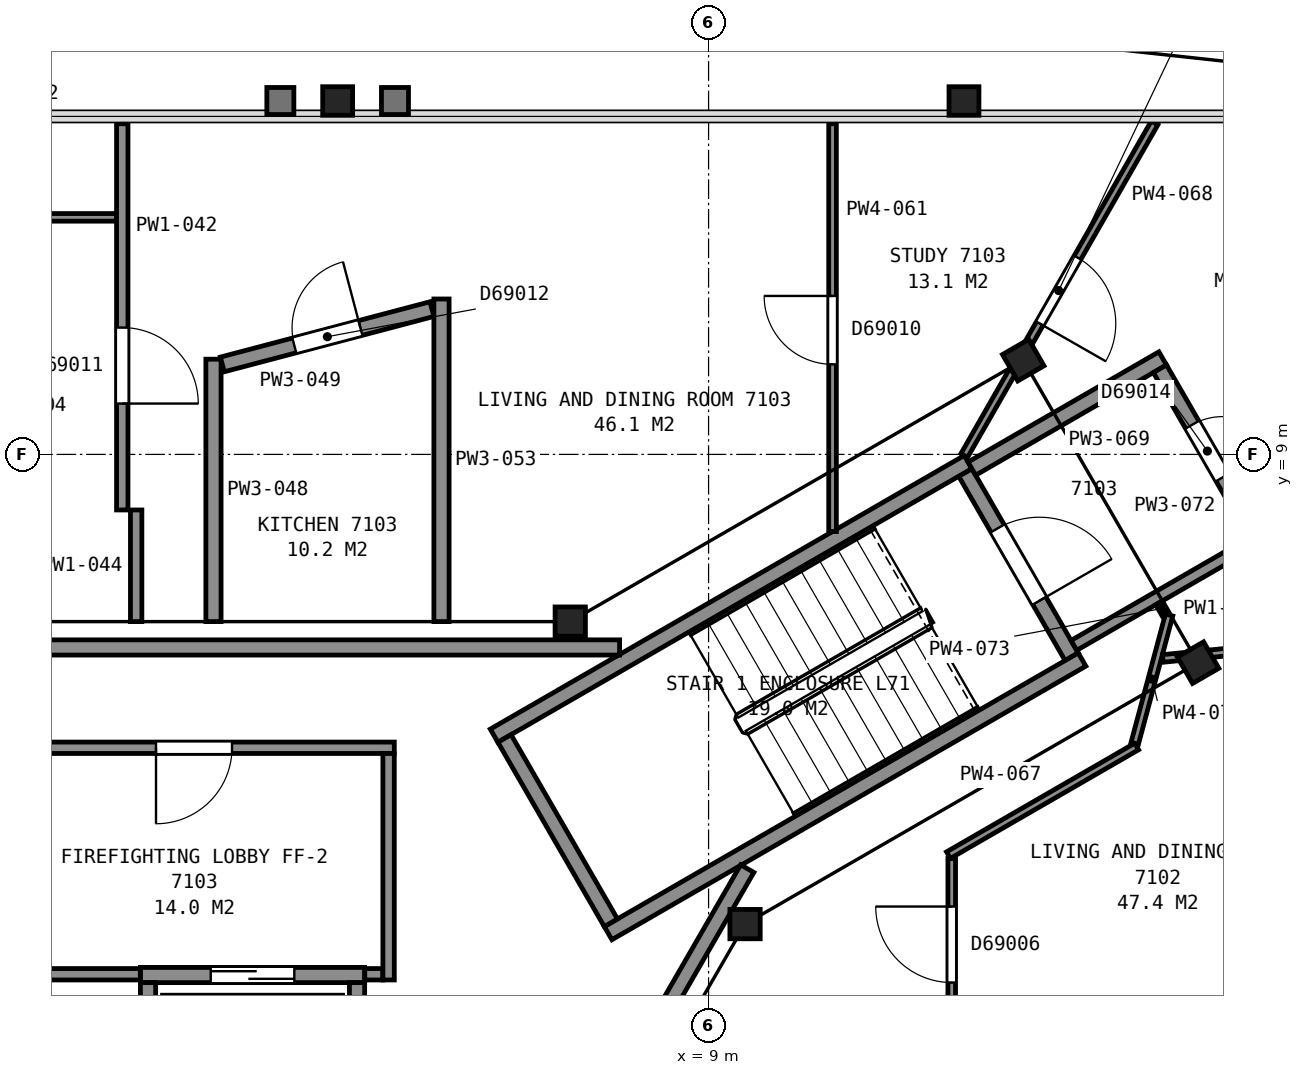
"""IFC4 building model, lengths in metres.
Left out: names, types, materials, properties, quantities, classifications, styles, units other than length and angle.
Written with IfcOpenShell. Run it as: python <this file> out.ifc"""

import sys

from ifc_helpers import new_model, si_unit, direction, frame, frame_2d, origin, origin_2d, place, context, subcontext, project, spatial, rectangle, i_section, extrude, element, fill, save


model = new_model("IFC4")
c1 = context("Model", 3, precision=1e-05, world=origin(), true_north=direction((0.0, 1.0)))
c2 = subcontext(c1, "Body", "Model", "MODEL_VIEW")
j1 = project(units=[si_unit("LENGTHUNIT", "METRE"), si_unit("PLANEANGLEUNIT", "RADIAN")], contexts=[c1])
p1 = place(None, origin())
s1 = spatial("IfcSite", under=j1, at=p1, CompositionType="ELEMENT")
p2 = place(p1, origin())
s2 = spatial("IfcBuilding", under=s1, at=p2, CompositionType="ELEMENT")
p3 = place(p2, frame((0.0, 0.0, 282.5)))
s3 = spatial("IfcBuildingStorey", under=s2, at=p3, CompositionType="ELEMENT", Elevation=282.5)
for number, where, z_axis, x_axis in (
    (1, (12.36, 13.65, 0.0), (0.0, 0.0, 1.0), (1.0, 0.0, 0.0)),
    (2, (4.12, 13.65, 0.0), (0.0, 0.0, 1.0), (1.0, 0.0, 0.0)),
):
    element("IfcColumn", number, at=place(p3, frame(where, z_axis=z_axis, x_axis=x_axis)), inside=s3, PredefinedType="COLUMN", context=c2, shape_type="SweptSolid", body=[
        extrude(i_section(OverallWidth=0.394, OverallDepth=0.376, WebThickness=0.017, FlangeThickness=0.028, FilletRadius=0.015, at=origin_2d()), origin(), (0.0, 0.0, 1.0), 3.7),
    ])
p4 = place(p3, frame((9.48, 2.82, 0.0), z_axis=(0.0, 0.0, 1.0), x_axis=(1.0, 0.0, 0.0)))
e3 = element("IfcColumn", 3, at=p4, inside=s3, PredefinedType="COLUMN", context=c2, shape_type="SweptSolid", body=[
    extrude(i_section(OverallWidth=0.399, OverallDepth=0.386, WebThickness=0.021, FlangeThickness=0.033, FilletRadius=0.015, at=origin_2d()), origin(), (0.0, 0.0, 1.0), 3.7),
])
for number, where, z_axis, x_axis in (
    (4, (15.44, 6.26, 0.0), (0.0, 0.0, 1.0), (0.5, -0.866, 0.0)),
    (5, (13.14, 10.24, 0.0), (0.0, 0.0, 1.0), (0.5, -0.866, 0.0)),
):
    element("IfcColumn", number, at=place(p3, frame(where, z_axis=z_axis, x_axis=x_axis)), inside=s3, PredefinedType="COLUMN", context=c2, shape_type="SweptSolid", body=[
        extrude(i_section(OverallWidth=0.401, OverallDepth=0.399, WebThickness=0.025, FlangeThickness=0.04, FilletRadius=0.015, at=origin_2d()), origin(), (0.0, 0.0, 1.0), 3.7),
    ])
p5 = place(p3, frame((7.18, 6.8, 0.0), z_axis=(0.0, 0.0, 1.0), x_axis=(1.0, 0.0, 0.0)))
e6 = element("IfcColumn", 6, at=p5, inside=s3, PredefinedType="COLUMN", context=c2, shape_type="SweptSolid", body=[
    extrude(i_section(OverallWidth=0.399, OverallDepth=0.386, WebThickness=0.021, FlangeThickness=0.033, FilletRadius=0.015, at=origin_2d()), origin(), (0.0, 0.0, 1.0), 3.7),
])
p6 = place(p3, frame((13.777, 6.338, 0.0), z_axis=(0.0, 0.0, 1.0), x_axis=(-0.500049511043, 0.865996816683, 0.0)))
e7 = element("IfcWall", 7, at=p6, inside=s3, PredefinedType="PARTITIONING", context=c2, shape_type="SweptSolid", body=[
    extrude(rectangle(XDim=2.8, YDim=0.2, at=frame_2d((1.4, 0.0))), origin(), (0.0, 0.0, 1.0), 3.45),
])
p7 = place(p6, frame((0.85, 0.0, 0.0)))
e8 = element("IfcOpeningElement", 8, at=p7, cuts=e7, PredefinedType="OPENING", context=c2, shape_type="SweptSolid", body=[
    extrude(rectangle(XDim=1.1, YDim=2.1, at=frame_2d((0.55, 1.05))), frame((0.0, 0.11, 0.0), z_axis=(0.0, -1.0, 0.0), x_axis=(1.0, 0.0, 0.0)), (0.0, 0.0, 1.0), 0.22),
])
for number, where, z_axis, x_axis in (
    (9, (6.178, 5.299, 0.0), (0.0, 0.0, 1.0), (0.866, 0.5, 0.0)),
    (10, (7.678, 2.701, 0.0), (0.0, 0.0, 1.0), (0.866, 0.5, 0.0)),
):
    element("IfcWall", number, at=place(p3, frame(where, z_axis=z_axis, x_axis=x_axis)), inside=s3, PredefinedType="PARTITIONING", context=c2, shape_type="SweptSolid", body=[
        extrude(rectangle(XDim=7.2, YDim=0.2, at=frame_2d((3.6, 0.0))), origin(), (0.0, 0.0, 1.0), 3.45),
    ])
p8 = place(p3, frame((7.715, 2.838, 0.0), z_axis=(0.0, 0.0, 1.0), x_axis=(-0.500049511043, 0.865996816683, 0.0)))
e11 = element("IfcWall", 11, at=p8, inside=s3, PredefinedType="PARTITIONING", context=c2, shape_type="SweptSolid", body=[
    extrude(rectangle(XDim=2.8, YDim=0.2, at=frame_2d((1.4, 0.0))), origin(), (0.0, 0.0, 1.0), 3.45),
])
p9 = place(p3, frame((1.525, 2.15, 0.0), z_axis=(0.0, 0.0, 1.0), x_axis=(1.0, 0.0, 0.0)))
e12 = element("IfcWall", 12, at=p9, inside=s3, PredefinedType="PARTITIONING", context=c2, shape_type="SweptSolid", body=[
    extrude(rectangle(XDim=2.95, YDim=0.2, at=frame_2d((1.475, 0.0))), origin(), (0.0, 0.0, 1.0), 3.7),
])
p10 = place(p9, frame((0.925, 0.0, 0.0)))
e13 = element("IfcOpeningElement", 13, at=p10, cuts=e12, PredefinedType="OPENING", context=c2, shape_type="SweptSolid", body=[
    extrude(rectangle(XDim=1.1, YDim=2.1, at=frame_2d((0.55, 1.05))), frame((0.0, 0.11, 0.0), z_axis=(0.0, -1.0, 0.0), x_axis=(1.0, 0.0, 0.0)), (0.0, 0.0, 1.0), 0.22),
])
for number, where, z_axis, x_axis in (
    (14, (4.375, 0.1, 0.0), (0.0, 0.0, 1.0), (0.0, 1.0, 0.0)),
    (15, (1.625, 0.1, 0.0), (0.0, 0.0, 1.0), (0.0, 1.0, 0.0)),
):
    element("IfcWall", number, at=place(p3, frame(where, z_axis=z_axis, x_axis=x_axis)), inside=s3, PredefinedType="PARTITIONING", context=c2, shape_type="SweptSolid", body=[
        extrude(rectangle(XDim=1.95, YDim=0.2, at=frame_2d((0.975, 0.0))), origin(), (0.0, 0.0, 1.0), 3.7),
    ])
p11 = place(p3, frame((7.829, 6.46, 0.0), z_axis=(0.0, 0.0, 1.0), x_axis=(-1.0, 0.0, 0.0)))
e16 = element("IfcWall", 16, at=p11, inside=s3, PredefinedType="PARTITIONING", context=c2, shape_type="SweptSolid", body=[
    extrude(rectangle(XDim=15.658, YDim=0.2, at=frame_2d((7.829, 0.0))), origin(), (0.0, 0.0, 1.0), 3.45),
])
p12 = place(p11, frame((12.168, 0.0, 0.0)))
e17 = element("IfcOpeningElement", 17, at=p12, cuts=e16, PredefinedType="OPENING", context=c2, shape_type="SweptSolid", body=[
    extrude(rectangle(XDim=1.2, YDim=2.1, at=frame_2d((0.6, 1.05))), frame((0.0, 0.11, 0.0), z_axis=(0.0, -1.0, 0.0), x_axis=(1.0, 0.0, 0.0)), (0.0, 0.0, 1.0), 0.22),
])
p13 = place(p3, frame((-0.245, 5.14, 0.0), z_axis=(0.0, 0.0, 1.0), x_axis=(1.0, 0.0, 0.0)))
e18 = element("IfcWall", 18, at=p13, inside=s3, PredefinedType="PARTITIONING", context=c2, shape_type="SweptSolid", body=[
    extrude(rectangle(XDim=5.11, YDim=0.15, at=frame_2d((2.555, 0.0))), origin(), (0.0, 0.0, 1.0), 3.45),
])
p14 = place(p13, frame((1.975, 0.0, 0.0)))
e19 = element("IfcOpeningElement", 19, at=p14, cuts=e18, PredefinedType="OPENING", context=c2, shape_type="SweptSolid", body=[
    extrude(rectangle(XDim=1.0, YDim=2.1, at=frame_2d((0.5, 1.05))), frame((0.0, 0.085, 0.0), z_axis=(0.0, -1.0, 0.0), x_axis=(1.0, 0.0, 0.0)), (0.0, 0.0, 1.0), 0.17),
])
p15 = place(p3, frame((0.167, 2.16, 0.0), z_axis=(0.0, 0.0, 1.0), x_axis=(1.0, 0.0, 0.0)))
e20 = element("IfcWall", 20, at=p15, inside=s3, PredefinedType="PARTITIONING", context=c2, shape_type="SweptSolid", body=[
    extrude(rectangle(XDim=1.356, YDim=0.15, at=frame_2d((0.678, 0.0))), origin(), (0.0, 0.0, 1.0), 3.45),
])
p16 = place(p3, frame((3.828, -6.29, 0.0), z_axis=(0.0, 0.0, 1.0), x_axis=(0.499979739078, 0.866037101117, 0.0)))
e21 = element("IfcWall", 21, at=p16, inside=s3, PredefinedType="PARTITIONING", context=c2, shape_type="SweptSolid", body=[
    extrude(rectangle(XDim=11.363, YDim=0.2, at=frame_2d((5.681, 0.0))), origin(), (0.0, 0.0, 1.0), 3.45),
])
p17 = place(p16, frame((0.55, 0.0, 0.0)))
e22 = element("IfcOpeningElement", 22, at=p17, cuts=e21, PredefinedType="OPENING", context=c2, shape_type="SweptSolid", body=[
    extrude(rectangle(XDim=1.2, YDim=2.1, at=frame_2d((0.6, 1.05))), frame((0.0, 0.11, 0.0), z_axis=(0.0, -1.0, 0.0), x_axis=(1.0, 0.0, 0.0)), (0.0, 0.0, 1.0), 0.22),
])
p18 = place(p3, frame((4.477, 2.16, 0.0), z_axis=(0.0, 0.0, 1.0), x_axis=(1.0, 0.0, 0.0)))
e23 = element("IfcWall", 23, at=p18, inside=s3, PredefinedType="PARTITIONING", context=c2, shape_type="SweptSolid", body=[
    extrude(rectangle(XDim=0.238, YDim=0.15, at=frame_2d((0.119, 0.0))), origin(), (0.0, 0.0, 1.0), 3.45),
])
p19 = place(p3, frame((4.79, 2.085, 0.0), z_axis=(0.0, 0.0, 1.0), x_axis=(0.0, 1.0, 0.0)))
e24 = element("IfcWall", 24, at=p19, inside=s3, PredefinedType="PARTITIONING", context=c2, shape_type="SweptSolid", body=[
    extrude(rectangle(XDim=2.98, YDim=0.15, at=frame_2d((1.49, 0.0))), origin(), (0.0, 0.0, 1.0), 3.45),
])
p20 = place(p3, frame((-3.109, 12.119, 0.0), z_axis=(0.0, 0.0, 1.0), x_axis=(1.0, 0.0, 0.0)))
e25 = element("IfcWall", 25, at=p20, inside=s3, PredefinedType="PARTITIONING", context=c2, shape_type="SweptSolid", body=[
    extrude(rectangle(XDim=4.32, YDim=0.1, at=frame_2d((2.16, 0.0))), origin(), (0.0, 0.0, 1.0), 2.723),
])
p21 = place(p20, frame((1.7, 0.0, 0.0)))
e26 = element("IfcOpeningElement", 26, at=p21, cuts=e25, PredefinedType="OPENING", context=c2, shape_type="SweptSolid", body=[
    extrude(rectangle(XDim=1.0, YDim=2.1, at=frame_2d((0.5, 1.05))), frame((0.0, 0.06, 0.0), z_axis=(0.0, -1.0, 0.0), x_axis=(1.0, 0.0, 0.0)), (0.0, 0.0, 1.0), 0.12),
])
p22 = place(p3, frame((1.286, 13.351, 0.0), z_axis=(0.0, 0.0, 1.0), x_axis=(0.0, -1.0, 0.0)))
e27 = element("IfcWall", 27, at=p22, inside=s3, PredefinedType="PARTITIONING", context=c2, shape_type="SweptSolid", body=[
    extrude(rectangle(XDim=5.082, YDim=0.15, at=frame_2d((2.541, 0.0))), origin(), (0.0, 0.0, 1.0), 2.723),
])
p23 = place(p22, frame((2.682, 0.0, 0.0)))
e28 = element("IfcOpeningElement", 28, at=p23, cuts=e27, PredefinedType="OPENING", context=c2, shape_type="SweptSolid", body=[
    extrude(rectangle(XDim=1.0, YDim=2.1, at=frame_2d((0.5, 1.05))), frame((0.0, 0.085, 0.0), z_axis=(0.0, -1.0, 0.0), x_axis=(1.0, 0.0, 0.0)), (0.0, 0.0, 1.0), 0.17),
])
p24 = place(p3, frame((1.469, 6.8, 0.0), z_axis=(0.0, 0.0, 1.0), x_axis=(0.0, 1.0, 0.0)))
e29 = element("IfcWall", 29, at=p24, inside=s3, PredefinedType="PARTITIONING", context=c2, shape_type="SweptSolid", body=[
    extrude(rectangle(XDim=1.469, YDim=0.15, at=frame_2d((0.734, 0.0))), origin(), (0.0, 0.0, 1.0), 2.723),
])
p25 = place(p3, frame((2.486, 6.8, 0.0), z_axis=(0.0, 0.0, 1.0), x_axis=(0.0, 1.0, 0.0)))
e30 = element("IfcWall", 30, at=p25, inside=s3, PredefinedType="PARTITIONING", context=c2, shape_type="SweptSolid", body=[
    extrude(rectangle(XDim=3.453, YDim=0.2, at=frame_2d((1.727, 0.0))), origin(), (0.0, 0.0, 1.0), 2.723),
])
p26 = place(p3, frame((5.36, 10.912, 0.0), z_axis=(0.0, 0.0, 1.0), x_axis=(-0.966866921155, -0.255280936963, 0.0)))
e31 = element("IfcWall", 31, at=p26, inside=s3, PredefinedType="PARTITIONING", context=c2, shape_type="SweptSolid", body=[
    extrude(rectangle(XDim=2.853, YDim=0.2, at=frame_2d((1.426, 0.0))), origin(), (0.0, 0.0, 1.0), 2.723),
])
p27 = place(p26, frame((0.973, 0.0, 0.0)))
e32 = element("IfcOpeningElement", 32, at=p27, cuts=e31, PredefinedType="OPENING", context=c2, shape_type="SweptSolid", body=[
    extrude(rectangle(XDim=0.9, YDim=2.1, at=frame_2d((0.45, 1.05))), frame((0.0, 0.11, 0.0), z_axis=(0.0, -1.0, 0.0), x_axis=(1.0, 0.0, 0.0)), (0.0, 0.0, 1.0), 0.22),
])
p28 = place(p3, frame((5.486, 6.8, 0.0), z_axis=(0.0, 0.0, 1.0), x_axis=(0.0, 1.0, 0.0)))
e33 = element("IfcWall", 33, at=p28, inside=s3, PredefinedType="PARTITIONING", context=c2, shape_type="SweptSolid", body=[
    extrude(rectangle(XDim=4.245, YDim=0.2, at=frame_2d((2.123, 0.0))), origin(), (0.0, 0.0, 1.0), 2.723),
])
p29 = place(p3, frame((10.631, 13.351, 0.0), z_axis=(0.0, 0.0, 1.0), x_axis=(0.0, -1.0, 0.0)))
e34 = element("IfcWall", 34, at=p29, inside=s3, PredefinedType="PARTITIONING", context=c2, shape_type="SweptSolid", body=[
    extrude(rectangle(XDim=5.366, YDim=0.1, at=frame_2d((2.683, 0.0))), origin(), (0.0, 0.0, 1.0), 2.723),
])
p30 = place(p29, frame((2.266, 0.0, 0.0)))
e35 = element("IfcOpeningElement", 35, at=p30, cuts=e34, PredefinedType="OPENING", context=c2, shape_type="SweptSolid", body=[
    extrude(rectangle(XDim=0.9, YDim=2.1, at=frame_2d((0.45, 1.05))), frame((0.0, 0.06, 0.0), z_axis=(0.0, -1.0, 0.0), x_axis=(1.0, 0.0, 0.0)), (0.0, 0.0, 1.0), 0.12),
])
p31 = place(p3, frame((12.199, 3.682, 0.0), z_axis=(0.0, 0.0, 1.0), x_axis=(0.0, -1.0, 0.0)))
e36 = element("IfcWall", 36, at=p31, inside=s3, PredefinedType="PARTITIONING", context=c2, shape_type="SweptSolid", body=[
    extrude(rectangle(XDim=2.331, YDim=0.1, at=frame_2d((1.166, 0.0))), origin(), (0.0, 0.0, 1.0), 2.723),
])
p32 = place(p31, frame((0.631, 0.0, 0.0)))
e37 = element("IfcOpeningElement", 37, at=p32, cuts=e36, PredefinedType="OPENING", context=c2, shape_type="SweptSolid", body=[
    extrude(rectangle(XDim=1.0, YDim=2.1, at=frame_2d((0.5, 1.05))), frame((0.0, 0.06, 0.0), z_axis=(0.0, -1.0, 0.0), x_axis=(1.0, 0.0, 0.0)), (0.0, 0.0, 1.0), 0.12),
])
p33 = place(p3, frame((12.156, 3.727, 0.0), z_axis=(0.0, 0.0, 1.0), x_axis=(0.866012137121, 0.500022977831, 0.0)))
e38 = element("IfcWall", 38, at=p33, inside=s3, PredefinedType="PARTITIONING", context=c2, shape_type="SweptSolid", body=[
    extrude(rectangle(XDim=2.86, YDim=0.1, at=frame_2d((1.43, 0.0))), origin(), (0.0, 0.0, 1.0), 2.723),
])
p34 = place(p3, frame((14.868, 13.362, 0.0), z_axis=(0.0, 0.0, 1.0), x_axis=(-0.496681239155, -0.867933031214, 0.0)))
e39 = element("IfcWall", 39, at=p34, inside=s3, PredefinedType="PARTITIONING", context=c2, shape_type="SweptSolid", body=[
    extrude(rectangle(XDim=5.041, YDim=0.1, at=frame_2d((2.521, 0.0))), origin(), (0.0, 0.0, 1.0), 2.723),
])
p35 = place(p34, frame((2.041, 0.0, 0.0)))
e40 = element("IfcOpeningElement", 40, at=p35, cuts=e39, PredefinedType="OPENING", context=c2, shape_type="SweptSolid", body=[
    extrude(rectangle(XDim=1.0, YDim=2.1, at=frame_2d((0.5, 1.05))), frame((0.0, 0.06, 0.0), z_axis=(0.0, -1.0, 0.0), x_axis=(1.0, 0.0, 0.0)), (0.0, 0.0, 1.0), 0.12),
])
p36 = place(p3, frame((12.464, 8.813, 0.0), z_axis=(0.0, 0.0, 1.0), x_axis=(0.865948555758, 0.50013308107, 0.0)))
e41 = element("IfcWall", 41, at=p36, inside=s3, PredefinedType="PARTITIONING", context=c2, shape_type="SweptSolid", body=[
    extrude(rectangle(XDim=2.899, YDim=0.2, at=frame_2d((1.45, 0.0))), origin(), (0.0, 0.0, 1.0), 2.723),
])
p37 = place(p3, frame((13.806, 6.487, 0.0), z_axis=(0.0, 0.0, 1.0), x_axis=(0.866056369097, 0.49994636267, 0.0)))
e42 = element("IfcWall", 42, at=p37, inside=s3, PredefinedType="PARTITIONING", context=c2, shape_type="SweptSolid", body=[
    extrude(rectangle(XDim=2.8, YDim=0.15, at=frame_2d((1.4, 0.0))), origin(), (0.0, 0.0, 1.0), 2.723),
])
p38 = place(p3, frame((14.607, 5.2, 0.0), z_axis=(0.0, 0.0, 1.0), x_axis=(0.258549793661, 0.965997931777, 0.0)))
e43 = element("IfcWall", 43, at=p38, inside=s3, PredefinedType="PARTITIONING", context=c2, shape_type="SweptSolid", body=[
    extrude(rectangle(XDim=1.747, YDim=0.1, at=frame_2d((0.874, 0.0))), origin(), (0.0, 0.0, 1.0), 2.723),
])
p39 = place(p3, frame((16.194, 7.952, 0.0), z_axis=(0.0, 0.0, 1.0), x_axis=(-0.500039460523, 0.866002620042, 0.0)))
e44 = element("IfcWall", 44, at=p39, inside=s3, PredefinedType="PARTITIONING", context=c2, shape_type="SweptSolid", body=[
    extrude(rectangle(XDim=2.511, YDim=0.2, at=frame_2d((1.255, 0.0))), origin(), (0.0, 0.0, 1.0), 2.723),
])
p40 = place(p39, frame((0.861, 0.0, 0.0)))
e45 = element("IfcOpeningElement", 45, at=p40, cuts=e44, PredefinedType="OPENING", context=c2, shape_type="SweptSolid", body=[
    extrude(rectangle(XDim=0.8, YDim=2.1, at=frame_2d((0.4, 1.05))), frame((0.0, 0.11, 0.0), z_axis=(0.0, -1.0, 0.0), x_axis=(1.0, 0.0, 0.0)), (0.0, 0.0, 1.0), 0.22),
])
p41 = place(p3, frame((14.927, 7.047, 0.0), z_axis=(0.0, 0.0, 1.0), x_axis=(0.497687197367, -0.867356589631, 0.0)))
e46 = element("IfcWall", 46, at=p41, inside=s3, PredefinedType="PARTITIONING", context=c2, shape_type="SweptSolid", body=[
    extrude(rectangle(XDim=0.17, YDim=0.1, at=frame_2d((0.085, 0.0))), origin(), (0.0, 0.0, 1.0), 2.723),
])
p42 = place(p3, frame((14.976, 6.315, 0.0), z_axis=(0.0, 0.0, 1.0), x_axis=(0.995082940066, 0.09904515329, 0.0)))
e47 = element("IfcWall", 47, at=p42, inside=s3, PredefinedType="PARTITIONING", context=c2, shape_type="SweptSolid", body=[
    extrude(rectangle(XDim=4.375, YDim=0.1, at=frame_2d((2.188, 0.0))), origin(), (0.0, 0.0, 1.0), 2.723),
])
p43 = place(p42, frame((1.628, 0.0, 0.0)))
e48 = element("IfcOpeningElement", 48, at=p43, cuts=e47, PredefinedType="OPENING", context=c2, shape_type="SweptSolid", body=[
    extrude(rectangle(XDim=1.0, YDim=2.1, at=frame_2d((0.5, 1.05))), frame((0.0, 0.06, 0.0), z_axis=(0.0, -1.0, 0.0), x_axis=(1.0, 0.0, 0.0)), (0.0, 0.0, 1.0), 0.12),
])
p44 = place(p7, origin())
e49 = element("IfcDoor", 49, at=p44, inside=s3, OperationType="SINGLE_SWING_LEFT", PredefinedType="DOOR", context=c2, shape_type="SweptSolid", body=[
    extrude(rectangle(XDim=1.1, YDim=2.1, at=frame_2d((0.55, 1.05))), frame((0.0, 0.025, 0.0), z_axis=(0.0, -1.0, 0.0), x_axis=(1.0, 0.0, 0.0)), (0.0, 0.0, 1.0), 0.05),
])
fill(e8, e49)
p45 = place(p10, origin())
e50 = element("IfcDoor", 50, at=p45, inside=s3, OperationType="SLIDING_TO_RIGHT", PredefinedType="DOOR", context=c2, shape_type="SweptSolid", body=[
    extrude(rectangle(XDim=1.1, YDim=2.1, at=frame_2d((0.55, 1.05))), frame((0.0, 0.025, 0.0), z_axis=(0.0, -1.0, 0.0), x_axis=(1.0, 0.0, 0.0)), (0.0, 0.0, 1.0), 0.05),
])
fill(e13, e50)
p46 = place(p14, origin())
e51 = element("IfcDoor", 51, at=p46, inside=s3, OperationType="SINGLE_SWING_LEFT", PredefinedType="DOOR", context=c2, shape_type="SweptSolid", body=[
    extrude(rectangle(XDim=1.0, YDim=2.1, at=frame_2d((0.5, 1.05))), frame((0.0, 0.025, 0.0), z_axis=(0.0, -1.0, 0.0), x_axis=(1.0, 0.0, 0.0)), (0.0, 0.0, 1.0), 0.05),
])
fill(e19, e51)
p47 = place(p23, origin())
e52 = element("IfcDoor", 52, at=p47, inside=s3, OperationType="SINGLE_SWING_RIGHT", PredefinedType="DOOR", context=c2, shape_type="SweptSolid", body=[
    extrude(rectangle(XDim=1.0, YDim=2.1, at=frame_2d((0.5, 1.05))), frame((0.0, 0.025, 0.0), z_axis=(0.0, -1.0, 0.0), x_axis=(1.0, 0.0, 0.0)), (0.0, 0.0, 1.0), 0.05),
])
fill(e28, e52)
p48 = place(p27, origin())
e53 = element("IfcDoor", 53, at=p48, inside=s3, OperationType="SINGLE_SWING_LEFT", PredefinedType="DOOR", context=c2, shape_type="SweptSolid", body=[
    extrude(rectangle(XDim=0.9, YDim=2.1, at=frame_2d((0.45, 1.05))), frame((0.0, 0.025, 0.0), z_axis=(0.0, -1.0, 0.0), x_axis=(1.0, 0.0, 0.0)), (0.0, 0.0, 1.0), 0.05),
])
fill(e32, e53)
p49 = place(p30, origin())
e54 = element("IfcDoor", 54, at=p49, inside=s3, OperationType="SINGLE_SWING_LEFT", PredefinedType="DOOR", context=c2, shape_type="SweptSolid", body=[
    extrude(rectangle(XDim=0.9, YDim=2.1, at=frame_2d((0.45, 1.05))), frame((0.0, 0.025, 0.0), z_axis=(0.0, -1.0, 0.0), x_axis=(1.0, 0.0, 0.0)), (0.0, 0.0, 1.0), 0.05),
])
fill(e35, e54)
p50 = place(p32, origin())
e55 = element("IfcDoor", 55, at=p50, inside=s3, OperationType="SINGLE_SWING_LEFT", PredefinedType="DOOR", context=c2, shape_type="SweptSolid", body=[
    extrude(rectangle(XDim=1.0, YDim=2.1, at=frame_2d((0.5, 1.05))), frame((0.0, 0.025, 0.0), z_axis=(0.0, -1.0, 0.0), x_axis=(1.0, 0.0, 0.0)), (0.0, 0.0, 1.0), 0.05),
])
fill(e37, e55)
p51 = place(p35, origin())
e56 = element("IfcDoor", 56, at=p51, inside=s3, OperationType="SINGLE_SWING_RIGHT", PredefinedType="DOOR", context=c2, shape_type="SweptSolid", body=[
    extrude(rectangle(XDim=1.0, YDim=2.1, at=frame_2d((0.5, 1.05))), frame((0.0, 0.025, 0.0), z_axis=(0.0, -1.0, 0.0), x_axis=(1.0, 0.0, 0.0)), (0.0, 0.0, 1.0), 0.05),
])
fill(e40, e56)
p52 = place(p40, origin())
e57 = element("IfcDoor", 57, at=p52, inside=s3, OperationType="SINGLE_SWING_LEFT", PredefinedType="DOOR", context=c2, shape_type="SweptSolid", body=[
    extrude(rectangle(XDim=0.8, YDim=2.1, at=frame_2d((0.4, 1.05))), frame((0.0, 0.025, 0.0), z_axis=(0.0, -1.0, 0.0), x_axis=(1.0, 0.0, 0.0)), (0.0, 0.0, 1.0), 0.05),
])
fill(e45, e57)
save(model, sys.argv[1])
